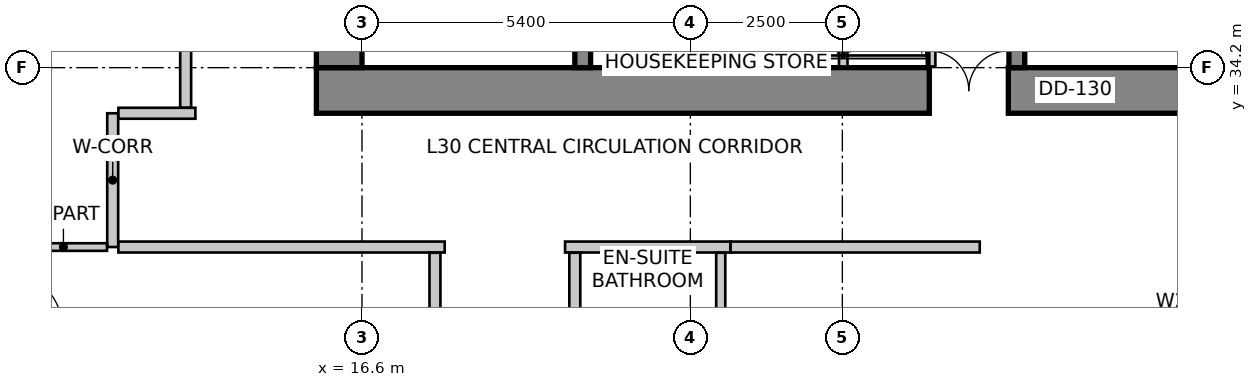
"""IFC4 building model, lengths in metres.
Left out: names, types, materials, properties, quantities, classifications, styles, units other than length and angle.
Written with IfcOpenShell. Run it as: python <this file> out.ifc"""

import sys

from ifc_helpers import new_model, si_unit, direction, frame, frame_2d, origin, place, context, subcontext, project, spatial, rectangle, extrude, source, transform, mapped, element, fill, save


model = new_model("IFC4")
c1 = context("Model", 3, precision=1e-05, world=origin(), true_north=direction((0.0, 1.0)))
c2 = subcontext(c1, "Body", "Model", "MODEL_VIEW")
j1 = project(units=[si_unit("LENGTHUNIT", "METRE"), si_unit("PLANEANGLEUNIT", "RADIAN")], contexts=[c1])
p1 = place(None, origin())
s1 = spatial("IfcSite", under=j1, at=p1, CompositionType="ELEMENT")
p2 = place(p1, origin())
s2 = spatial("IfcBuilding", under=s1, at=p2, CompositionType="ELEMENT")
p3 = place(p2, frame((0.0, 0.0, 125.0)))
s3 = spatial("IfcBuildingStorey", under=s2, at=p3, CompositionType="ELEMENT", Elevation=125.0)
p4 = place(p3, frame((15.85, 33.825, 0.0), z_axis=(0.0, 0.0, 1.0), x_axis=(1.0, 0.0, 0.0)))
e1 = element("IfcWall", 1, at=p4, inside=s3, PredefinedType="SHEAR", context=c2, shape_type="SweptSolid", body=[
    extrude(rectangle(XDim=15.9, YDim=0.75, at=frame_2d((7.95, 0.0))), origin(), (0.0, 0.0, 1.0), 3.6),
])
m1 = source(origin(), c2, "Body", "SweptSolid", [
    extrude(rectangle(XDim=1.3, YDim=2.15, at=frame_2d((0.65, 1.075))), frame((0.0, 0.385, 0.0), z_axis=(0.0, -1.0, 0.0), x_axis=(1.0, 0.0, 0.0)), (0.0, 0.0, 1.0), 0.77),
])
p5 = place(p4, frame((10.08, 0.0, 0.0)))
e2 = element("IfcOpeningElement", 2, at=p5, cuts=e1, PredefinedType="OPENING", context=c2, shape_type="MappedRepresentation", body=[
    mapped(m1, transform((0.0, 0.0, 0.0), scale=1.0)),
])
p6 = place(p3, frame((16.225, 34.2, 0.0), z_axis=(0.0, 0.0, 1.0), x_axis=(0.0, 1.0, 0.0)))
e3 = element("IfcWall", 3, at=p6, inside=s3, PredefinedType="SHEAR", context=c2, shape_type="SweptSolid", body=[
    extrude(rectangle(XDim=11.4, YDim=0.75, at=frame_2d((5.7, 0.0))), origin(), (0.0, 0.0, 1.0), 3.6),
])
m2 = source(origin(), c2, "Body", "SweptSolid", [
    extrude(rectangle(XDim=1.1, YDim=2.15, at=frame_2d((0.55, 1.075))), frame((0.0, 0.385, 0.0), z_axis=(0.0, -1.0, 0.0), x_axis=(1.0, 0.0, 0.0)), (0.0, 0.0, 1.0), 0.77),
])
p7 = place(p6, frame((7.15, 0.0, 0.0)))
e4 = element("IfcOpeningElement", 4, at=p7, cuts=e3, PredefinedType="OPENING", context=c2, shape_type="MappedRepresentation", body=[
    mapped(m2, transform((0.0, 0.0, 0.0), scale=1.0)),
])
p8 = place(p3, frame((20.23, 34.2, 0.0), z_axis=(0.0, 0.0, 1.0), x_axis=(0.0, 1.0, 0.0)))
e5 = element("IfcWall", 5, at=p8, inside=s3, PredefinedType="SHEAR", context=c2, shape_type="SweptSolid", body=[
    extrude(rectangle(XDim=9.06, YDim=0.26, at=frame_2d((4.53, 0.0))), origin(), (0.0, 0.0, 1.0), 3.6),
])
m3 = source(origin(), c2, "Body", "SweptSolid", [
    extrude(rectangle(XDim=1.1, YDim=2.15, at=frame_2d((0.55, 1.075))), frame((0.0, 0.14, 0.0), z_axis=(0.0, -1.0, 0.0), x_axis=(1.0, 0.0, 0.0)), (0.0, 0.0, 1.0), 0.28),
])
p9 = place(p8, frame((7.45, 0.0, 0.0)))
e6 = element("IfcOpeningElement", 6, at=p9, cuts=e5, PredefinedType="OPENING", context=c2, shape_type="MappedRepresentation", body=[
    mapped(m3, transform((0.0, 0.0, 0.0), scale=1.0)),
])
p10 = place(p3, frame((27.37, 34.2, 0.0), z_axis=(0.0, 0.0, 1.0), x_axis=(0.0, 1.0, 0.0)))
e7 = element("IfcWall", 7, at=p10, inside=s3, PredefinedType="SHEAR", context=c2, shape_type="SweptSolid", body=[
    extrude(rectangle(XDim=9.06, YDim=0.26, at=frame_2d((4.53, 0.0))), origin(), (0.0, 0.0, 1.0), 3.6),
])
p11 = place(p10, frame((7.45, 0.0, 0.0)))
e8 = element("IfcOpeningElement", 8, at=p11, cuts=e7, PredefinedType="OPENING", context=c2, shape_type="MappedRepresentation", body=[
    mapped(m3, transform((0.0, 0.0, 0.0), scale=1.0)),
])
p12 = place(p3, frame((28.884, 28.792, 0.0), z_axis=(0.0, 0.0, 1.0), x_axis=(0.707064797706, 0.707148762175, 0.0)))
e9 = element("IfcWall", 9, at=p12, inside=s3, PredefinedType="SOLIDWALL", context=c2, shape_type="SweptSolid", body=[
    extrude(rectangle(XDim=2.908, YDim=0.3, at=frame_2d((1.454, 0.0))), origin(), (0.0, 0.0, 1.0), 3.35),
])
m4 = source(origin(), c2, "Body", "SweptSolid", [
    extrude(rectangle(XDim=1.8, YDim=2.1, at=frame_2d((0.9, 1.05))), frame((0.0, 0.16, 0.0), z_axis=(0.0, -1.0, 0.0), x_axis=(1.0, 0.0, 0.0)), (0.0, 0.0, 1.0), 0.32),
])
p13 = place(p12, frame((0.554, 0.0, 0.85)))
e10 = element("IfcOpeningElement", 10, at=p13, cuts=e9, PredefinedType="OPENING", context=c2, shape_type="MappedRepresentation", body=[
    mapped(m4, transform((0.0, 0.0, 0.0), scale=1.0)),
])
p14 = place(p3, frame((13.269, 47.134, 0.0), z_axis=(0.0, 0.0, 1.0), x_axis=(-0.319929596295, -0.947441319246, 0.0)))
e11 = element("IfcWall", 11, at=p14, inside=s3, PredefinedType="SOLIDWALL", context=c2, shape_type="SweptSolid", body=[
    extrude(rectangle(XDim=16.134, YDim=0.3, at=frame_2d((8.067, 0.0))), origin(), (0.0, 0.0, 1.0), 3.35),
])
m5 = source(origin(), c2, "Body", "SweptSolid", [
    extrude(rectangle(XDim=2.4, YDim=2.2, at=frame_2d((1.2, 1.1))), frame((0.0, 0.16, 0.0), z_axis=(0.0, -1.0, 0.0), x_axis=(1.0, 0.0, 0.0)), (0.0, 0.0, 1.0), 0.32),
])
p15 = place(p14, frame((2.276, 0.0, 0.85)))
e12 = element("IfcOpeningElement", 12, at=p15, cuts=e11, PredefinedType="OPENING", context=c2, shape_type="MappedRepresentation", body=[
    mapped(m5, transform((0.0, 0.0, 0.0), scale=1.0)),
])
m6 = source(origin(), c2, "Body", "SweptSolid", [
    extrude(rectangle(XDim=2.1, YDim=2.0, at=frame_2d((1.05, 1.0))), frame((0.0, 0.16, 0.0), z_axis=(0.0, -1.0, 0.0), x_axis=(1.0, 0.0, 0.0)), (0.0, 0.0, 1.0), 0.32),
])
p16 = place(p14, frame((7.361, 0.0, 0.85)))
e13 = element("IfcOpeningElement", 13, at=p16, cuts=e11, PredefinedType="OPENING", context=c2, shape_type="MappedRepresentation", body=[
    mapped(m6, transform((0.0, 0.0, 0.0), scale=1.0)),
])
p17 = place(p14, frame((12.147, 0.0, 0.85)))
e14 = element("IfcOpeningElement", 14, at=p17, cuts=e11, PredefinedType="OPENING", context=c2, shape_type="MappedRepresentation", body=[
    mapped(m5, transform((0.0, 0.0, 0.0), scale=1.0)),
])
p18 = place(p3, frame((8.185, 31.834, 0.0), z_axis=(0.0, 0.0, 1.0), x_axis=(0.189707113148, -0.981840725994, 0.0)))
e15 = element("IfcWall", 15, at=p18, inside=s3, PredefinedType="SOLIDWALL", context=c2, shape_type="SweptSolid", body=[
    extrude(rectangle(XDim=21.221, YDim=0.3, at=frame_2d((10.611, 0.0))), origin(), (0.0, 0.0, 1.0), 3.35),
])
m7 = source(origin(), c2, "Body", "SweptSolid", [
    extrude(rectangle(XDim=1.2, YDim=1.6, at=frame_2d((0.6, 0.8))), frame((0.0, 0.16, 0.0), z_axis=(0.0, -1.0, 0.0), x_axis=(1.0, 0.0, 0.0)), (0.0, 0.0, 1.0), 0.32),
])
p19 = place(p18, frame((1.127, 0.0, 0.85)))
e16 = element("IfcOpeningElement", 16, at=p19, cuts=e15, PredefinedType="OPENING", context=c2, shape_type="MappedRepresentation", body=[
    mapped(m7, transform((0.0, 0.0, 0.0), scale=1.0)),
])
p20 = place(p18, frame((4.369, 0.0, 0.85)))
e17 = element("IfcOpeningElement", 17, at=p20, cuts=e15, PredefinedType="OPENING", context=c2, shape_type="MappedRepresentation", body=[
    mapped(m6, transform((0.0, 0.0, 0.0), scale=1.0)),
])
p21 = place(p18, frame((8.409, 0.0, 0.85)))
e18 = element("IfcOpeningElement", 18, at=p21, cuts=e15, PredefinedType="OPENING", context=c2, shape_type="MappedRepresentation", body=[
    mapped(m7, transform((0.0, 0.0, 0.0), scale=1.0)),
])
m8 = source(origin(), c2, "Body", "SweptSolid", [
    extrude(rectangle(XDim=1.5, YDim=1.8, at=frame_2d((0.75, 0.9))), frame((0.0, 0.16, 0.0), z_axis=(0.0, -1.0, 0.0), x_axis=(1.0, 0.0, 0.0)), (0.0, 0.0, 1.0), 0.32),
])
p22 = place(p18, frame((10.551, 0.0, 0.85)))
e19 = element("IfcOpeningElement", 19, at=p22, cuts=e15, PredefinedType="OPENING", context=c2, shape_type="MappedRepresentation", body=[
    mapped(m8, transform((0.0, 0.0, 0.0), scale=1.0)),
])
p23 = place(p18, frame((12.992, 0.0, 0.85)))
e20 = element("IfcOpeningElement", 20, at=p23, cuts=e15, PredefinedType="OPENING", context=c2, shape_type="MappedRepresentation", body=[
    mapped(m7, transform((0.0, 0.0, 0.0), scale=1.0)),
])
p24 = place(p18, frame((16.811, 0.0, 0.85)))
e21 = element("IfcOpeningElement", 21, at=p24, cuts=e15, PredefinedType="OPENING", context=c2, shape_type="MappedRepresentation", body=[
    mapped(m6, transform((0.0, 0.0, 0.0), scale=1.0)),
])
for number, where, z_axis, x_axis in (
    (22, (25.96, 34.22, 0.0), (0.0, 0.0, 1.0), (0.0, 1.0, 0.0)),
    (23, (23.07, 34.22, 0.0), (0.0, 0.0, 1.0), (0.0, 1.0, 0.0)),
    (24, (24.515, 34.22, 0.0), (0.0, 0.0, 1.0), (0.0, 1.0, 0.0)),
):
    element("IfcWall", number, at=place(p3, frame(where, z_axis=z_axis, x_axis=x_axis)), inside=s3, PredefinedType="SOLIDWALL", context=c2, shape_type="SweptSolid", body=[
        extrude(rectangle(XDim=1.62, YDim=0.14, at=frame_2d((0.81, 0.0))), origin(), (0.0, 0.0, 1.0), 2.642),
    ])
p25 = place(p3, frame((12.5, 31.25, 0.0), z_axis=(0.0, 0.0, 1.0), x_axis=(0.0, 1.0, 0.0)))
e25 = element("IfcWall", 25, at=p25, inside=s3, PredefinedType="PARTITIONING", context=c2, shape_type="SweptSolid", body=[
    extrude(rectangle(XDim=2.2, YDim=0.18, at=frame_2d((1.1, 0.0))), origin(), (0.0, 0.0, 1.0), 2.935),
])
p26 = place(p3, frame((12.594, 33.45, 0.0), z_axis=(0.0, 0.0, 1.0), x_axis=(1.0, 0.0, 0.0)))
e26 = element("IfcWall", 26, at=p26, inside=s3, PredefinedType="PARTITIONING", context=c2, shape_type="SweptSolid", body=[
    extrude(rectangle(XDim=1.266, YDim=0.18, at=frame_2d((0.633, 0.0))), origin(), (0.0, 0.0, 1.0), 3.35),
])
p27 = place(p3, frame((17.96, 31.25, 0.0), z_axis=(0.0, 0.0, 1.0), x_axis=(-1.0, 0.0, 0.0)))
e27 = element("IfcWall", 27, at=p27, inside=s3, PredefinedType="PARTITIONING", context=c2, shape_type="SweptSolid", body=[
    extrude(rectangle(XDim=5.366, YDim=0.18, at=frame_2d((2.683, 0.0))), origin(), (0.0, 0.0, 1.0), 2.935),
])
p28 = place(p3, frame((22.66, 31.25, 0.0), z_axis=(0.0, 0.0, 1.0), x_axis=(-1.0, 0.0, 0.0)))
e28 = element("IfcWall", 28, at=p28, inside=s3, PredefinedType="PARTITIONING", context=c2, shape_type="SweptSolid", body=[
    extrude(rectangle(XDim=2.72, YDim=0.18, at=frame_2d((1.36, 0.0))), origin(), (0.0, 0.0, 1.0), 2.935),
])
p29 = place(p3, frame((26.76, 31.25, 0.0), z_axis=(0.0, 0.0, 1.0), x_axis=(-1.0, 0.0, 0.0)))
e29 = element("IfcWall", 29, at=p29, inside=s3, PredefinedType="PARTITIONING", context=c2, shape_type="SweptSolid", body=[
    extrude(rectangle(XDim=4.098, YDim=0.18, at=frame_2d((2.049, 0.0))), origin(), (0.0, 0.0, 1.0), 3.35),
])
p30 = place(p3, frame((13.7, 33.544, 0.0), z_axis=(0.0, 0.0, 1.0), x_axis=(0.0, 1.0, 0.0)))
e30 = element("IfcWall", 30, at=p30, inside=s3, PredefinedType="PARTITIONING", context=c2, shape_type="SweptSolid", body=[
    extrude(rectangle(XDim=13.86, YDim=0.18, at=frame_2d((6.93, 0.0))), origin(), (0.0, 0.0, 1.0), 2.492),
])
m9 = source(origin(), c2, "Body", "SweptSolid", [
    extrude(rectangle(XDim=0.9, YDim=2.15, at=frame_2d((0.45, 1.075))), frame((0.0, 0.1, 0.0), z_axis=(0.0, -1.0, 0.0), x_axis=(1.0, 0.0, 0.0)), (0.0, 0.0, 1.0), 0.2),
])
p31 = place(p30, frame((4.253, 0.0, 0.0)))
e31 = element("IfcOpeningElement", 31, at=p31, cuts=e30, PredefinedType="OPENING", context=c2, shape_type="MappedRepresentation", body=[
    mapped(m9, transform((0.0, 0.0, 0.0), scale=1.0)),
])
p32 = place(p3, frame((12.406, 31.25, 0.0), z_axis=(0.0, 0.0, 1.0), x_axis=(-1.0, 0.0, 0.0)))
e32 = element("IfcWall", 32, at=p32, inside=s3, PredefinedType="PARTITIONING", context=c2, shape_type="SweptSolid", body=[
    extrude(rectangle(XDim=1.433, YDim=0.125, at=frame_2d((0.717, 0.0))), origin(), (0.0, 0.0, 1.0), 2.492),
])
p33 = place(p3, frame((17.8, 24.162, 0.0), z_axis=(0.0, 0.0, 1.0), x_axis=(0.0, 1.0, 0.0)))
e33 = element("IfcWall", 33, at=p33, inside=s3, PredefinedType="PARTITIONING", context=c2, shape_type="SweptSolid", body=[
    extrude(rectangle(XDim=6.994, YDim=0.18, at=frame_2d((3.497, 0.0))), origin(), (0.0, 0.0, 1.0), 2.788),
])
p34 = place(p33, frame((3.047, 0.0, 0.0)))
e34 = element("IfcOpeningElement", 34, at=p34, cuts=e33, PredefinedType="OPENING", context=c2, shape_type="MappedRepresentation", body=[
    mapped(m9, transform((0.0, 0.0, 0.0), scale=1.0)),
])
p35 = place(p3, frame((20.1, 31.156, 0.0), z_axis=(0.0, 0.0, 1.0), x_axis=(0.0, -1.0, 0.0)))
e35 = element("IfcWall", 35, at=p35, inside=s3, PredefinedType="PARTITIONING", context=c2, shape_type="SweptSolid", body=[
    extrude(rectangle(XDim=2.266, YDim=0.18, at=frame_2d((1.133, 0.0))), origin(), (0.0, 0.0, 1.0), 2.935),
])
p36 = place(p3, frame((22.5, 31.156, 0.0), z_axis=(0.0, 0.0, 1.0), x_axis=(0.0, -1.0, 0.0)))
e36 = element("IfcWall", 36, at=p36, inside=s3, PredefinedType="PARTITIONING", context=c2, shape_type="SweptSolid", body=[
    extrude(rectangle(XDim=2.027, YDim=0.15, at=frame_2d((1.014, 0.0))), origin(), (0.0, 0.0, 1.0), 2.935),
])
m10 = source(origin(), c2, "Body", "SweptSolid", [
    extrude(rectangle(XDim=1.8, YDim=2.1, at=frame_2d((0.9, 1.05))), frame((0.0, -0.015, 0.0), z_axis=(0.0, -1.0, 0.0), x_axis=(1.0, 0.0, 0.0)), (0.0, 0.0, 1.0), 0.06),
])
p37 = place(p13, origin())
e37 = element("IfcWindow", 37, at=p37, inside=s3, PartitioningType="SINGLE_PANEL", PredefinedType="WINDOW", context=c2, shape_type="MappedRepresentation", body=[
    mapped(m10, transform((0.0, 0.0, 0.0), scale=1.0)),
])
fill(e10, e37)
m11 = source(origin(), c2, "Body", "SweptSolid", [
    extrude(rectangle(XDim=1.3, YDim=2.15, at=frame_2d((0.65, 1.075))), frame((0.0, 0.025, 0.0), z_axis=(0.0, -1.0, 0.0), x_axis=(1.0, 0.0, 0.0)), (0.0, 0.0, 1.0), 0.05),
])
p38 = place(p5, origin())
e38 = element("IfcDoor", 38, at=p38, inside=s3, OperationType="DOUBLE_DOOR_SINGLE_SWING", PredefinedType="DOOR", context=c2, shape_type="MappedRepresentation", body=[
    mapped(m11, transform((0.0, 0.0, 0.0), scale=1.0)),
])
fill(e2, e38)
save(model, sys.argv[1])
